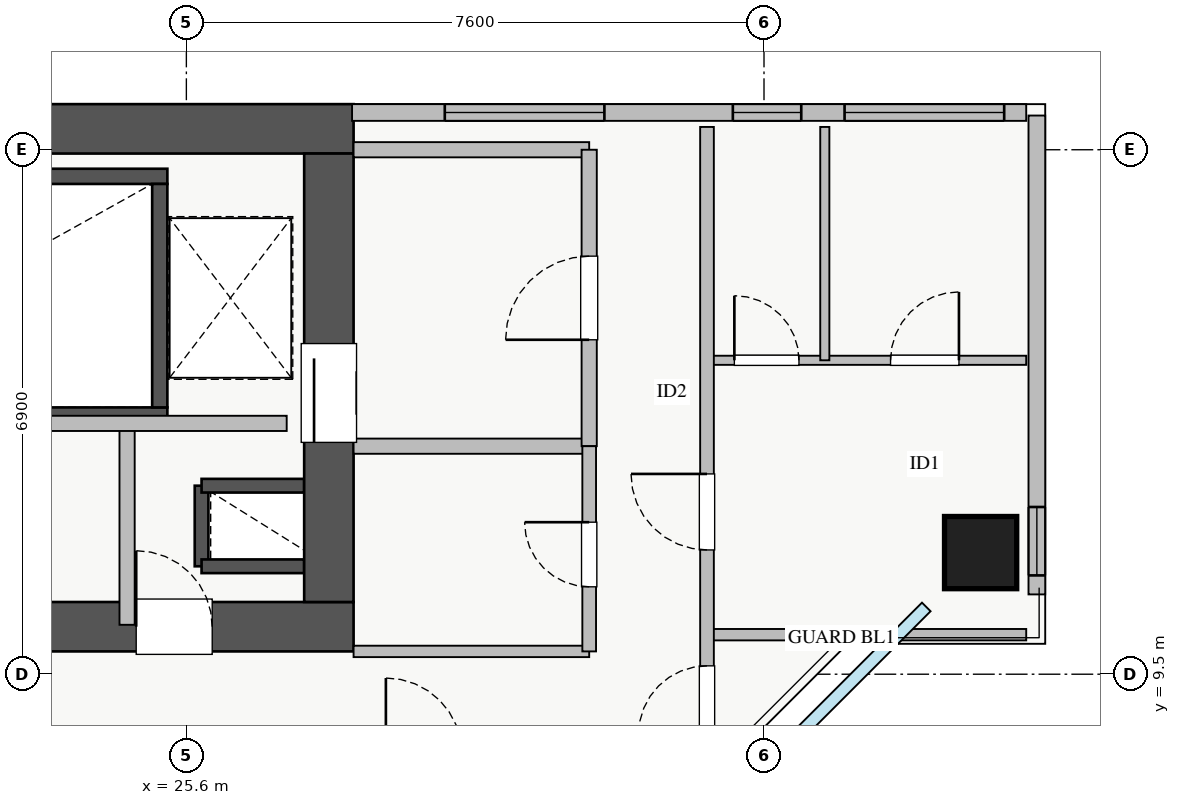
"""IFC4 building model, lengths in metres.
Left out: names, types, materials, properties, quantities, classifications, styles, units other than length and angle.
Written with IfcOpenShell. Run it as: python <this file> out.ifc"""

import sys

from ifc_helpers import new_model, si_unit, direction, frame, frame_2d, origin, origin_2d, place, context, subcontext, project, spatial, rectangle, extrude, source, transform, mapped, element, fill, save


model = new_model("IFC4")
c1 = context("Model", 3, precision=1e-05, world=origin(), true_north=direction((0.0, 1.0)))
c2 = subcontext(c1, "Body", "Model", "MODEL_VIEW")
j1 = project(units=[si_unit("LENGTHUNIT", "METRE"), si_unit("PLANEANGLEUNIT", "RADIAN")], contexts=[c1])
p1 = place(None, origin())
s1 = spatial("IfcSite", under=j1, at=p1, CompositionType="ELEMENT")
p2 = place(p1, origin())
s2 = spatial("IfcBuilding", under=s1, at=p2, CompositionType="ELEMENT")
p3 = place(p2, frame((0.0, 0.0, 156.75)))
s3 = spatial("IfcBuildingStorey", under=s2, at=p3, CompositionType="ELEMENT", Elevation=156.75)
p4 = place(p3, frame((25.8, 10.92, 0.0), z_axis=(0.0, 0.0, 1.0), x_axis=(0.0, 1.0, 0.0)))
e1 = element("IfcWall", 1, at=p4, inside=s3, PredefinedType="SHEAR", context=c2, shape_type="SweptSolid", body=[
    extrude(rectangle(XDim=1.06, YDim=0.18, at=frame_2d((0.53, 0.0))), origin(), (0.0, 0.0, 1.0), 3.07),
])
for number, where, z_axis, x_axis in (
    (2, (25.8, 11.98, 0.0), (0.0, 0.0, 1.0), (1.0, 0.0, 0.0)),
    (3, (25.8, 10.92, 0.0), (0.0, 0.0, 1.0), (1.0, 0.0, 0.0)),
):
    element("IfcWall", number, at=place(p3, frame(where, z_axis=z_axis, x_axis=x_axis)), inside=s3, PredefinedType="SHEAR", context=c2, shape_type="SweptSolid", body=[
        extrude(rectangle(XDim=1.35, YDim=0.18, at=frame_2d((0.675, 0.0))), origin(), (0.0, 0.0, 1.0), 3.07),
    ])
p5 = place(p3, frame((18.2, 12.91, 0.0), z_axis=(0.0, 0.0, 1.0), x_axis=(1.0, 0.0, 0.0)))
e4 = element("IfcWall", 4, at=p5, inside=s3, PredefinedType="SHEAR", context=c2, shape_type="SweptSolid", body=[
    extrude(rectangle(XDim=7.15, YDim=0.2, at=frame_2d((3.575, 0.0))), origin(), (0.0, 0.0, 1.0), 3.25),
])
p6 = place(p5, frame((0.35, 0.0, 0.0)))
e5 = element("IfcOpeningElement", 5, at=p6, cuts=e4, PredefinedType="OPENING", context=c2, shape_type="SweptSolid", body=[
    extrude(rectangle(XDim=1.1, YDim=2.05, at=frame_2d((0.55, 1.025))), frame((0.0, 0.11, 0.0), z_axis=(0.0, -1.0, 0.0), x_axis=(1.0, 0.0, 0.0)), (0.0, 0.0, 1.0), 0.22),
])
p7 = place(p3, frame((18.2, 16.05, 0.0), z_axis=(0.0, 0.0, 1.0), x_axis=(1.0, 0.0, 0.0)))
e6 = element("IfcWall", 6, at=p7, inside=s3, PredefinedType="SHEAR", context=c2, shape_type="SweptSolid", body=[
    extrude(rectangle(XDim=7.15, YDim=0.2, at=frame_2d((3.575, 0.0))), origin(), (0.0, 0.0, 1.0), 3.25),
])
p8 = place(p3, frame((25.25, 13.01, 0.0), z_axis=(0.0, 0.0, 1.0), x_axis=(0.0, 1.0, 0.0)))
e7 = element("IfcWall", 7, at=p8, inside=s3, PredefinedType="SHEAR", context=c2, shape_type="SweptSolid", body=[
    extrude(rectangle(XDim=2.94, YDim=0.2, at=frame_2d((1.47, 0.0))), origin(), (0.0, 0.0, 1.0), 3.25),
])
p9 = place(p3, frame((10.2, 10.125, 0.0), z_axis=(0.0, 0.0, 1.0), x_axis=(1.0, 0.0, 0.0)))
e8 = element("IfcWall", 8, at=p9, inside=s3, PredefinedType="SHEAR", context=c2, shape_type="SweptSolid", body=[
    extrude(rectangle(XDim=17.6, YDim=0.65, at=frame_2d((8.8, 0.0))), origin(), (0.0, 0.0, 1.0), 3.25),
])
p10 = place(p9, frame((1.15, 0.0, 0.0)))
e9 = element("IfcOpeningElement", 9, at=p10, cuts=e8, PredefinedType="OPENING", context=c2, shape_type="SweptSolid", body=[
    extrude(rectangle(XDim=1.1, YDim=2.05, at=frame_2d((0.55, 1.025))), frame((0.0, 0.335, 0.0), z_axis=(0.0, -1.0, 0.0), x_axis=(1.0, 0.0, 0.0)), (0.0, 0.0, 1.0), 0.67),
])
p11 = place(p9, frame((8.3, 0.0, 0.0)))
e10 = element("IfcOpeningElement", 10, at=p11, cuts=e8, PredefinedType="OPENING", context=c2, shape_type="SweptSolid", body=[
    extrude(rectangle(XDim=1.1, YDim=2.05, at=frame_2d((0.55, 1.025))), frame((0.0, 0.335, 0.0), z_axis=(0.0, -1.0, 0.0), x_axis=(1.0, 0.0, 0.0)), (0.0, 0.0, 1.0), 0.67),
])
p12 = place(p9, frame((4.9, 0.0, 0.0)))
e11 = element("IfcOpeningElement", 11, at=p12, cuts=e8, PredefinedType="OPENING", context=c2, shape_type="SweptSolid", body=[
    extrude(rectangle(XDim=1.1, YDim=2.05, at=frame_2d((0.55, 1.025))), frame((0.0, 0.335, 0.0), z_axis=(0.0, -1.0, 0.0), x_axis=(1.0, 0.0, 0.0)), (0.0, 0.0, 1.0), 0.67),
])
p13 = place(p9, frame((14.74, 0.0, 0.0)))
e12 = element("IfcOpeningElement", 12, at=p13, cuts=e8, PredefinedType="OPENING", context=c2, shape_type="SweptSolid", body=[
    extrude(rectangle(XDim=1.0, YDim=2.05, at=frame_2d((0.5, 1.025))), frame((0.0, 0.335, 0.0), z_axis=(0.0, -1.0, 0.0), x_axis=(1.0, 0.0, 0.0)), (0.0, 0.0, 1.0), 0.67),
])
p14 = place(p9, frame((11.67, 0.0, 0.0)))
e13 = element("IfcOpeningElement", 13, at=p14, cuts=e8, PredefinedType="OPENING", context=c2, shape_type="SweptSolid", body=[
    extrude(rectangle(XDim=1.0, YDim=2.05, at=frame_2d((0.5, 1.025))), frame((0.0, 0.335, 0.0), z_axis=(0.0, -1.0, 0.0), x_axis=(1.0, 0.0, 0.0)), (0.0, 0.0, 1.0), 0.67),
])
p15 = place(p3, frame((10.2, 16.675, 0.0), z_axis=(0.0, 0.0, 1.0), x_axis=(1.0, 0.0, 0.0)))
e14 = element("IfcWall", 14, at=p15, inside=s3, PredefinedType="SHEAR", context=c2, shape_type="SweptSolid", body=[
    extrude(rectangle(XDim=17.6, YDim=0.65, at=frame_2d((8.8, 0.0))), origin(), (0.0, 0.0, 1.0), 3.25),
])
p16 = place(p3, frame((27.475, 10.45, 0.0), z_axis=(0.0, 0.0, 1.0), x_axis=(0.0, 1.0, 0.0)))
e15 = element("IfcWall", 15, at=p16, inside=s3, PredefinedType="SHEAR", context=c2, shape_type="SweptSolid", body=[
    extrude(rectangle(XDim=5.9, YDim=0.65, at=frame_2d((2.95, 0.0))), origin(), (0.0, 0.0, 1.0), 3.25),
])
p17 = place(p16, frame((2.1, 0.0, 0.0)))
e16 = element("IfcOpeningElement", 16, at=p17, cuts=e15, PredefinedType="OPENING", context=c2, shape_type="SweptSolid", body=[
    extrude(rectangle(XDim=1.3, YDim=2.05, at=frame_2d((0.65, 1.025))), frame((0.0, 0.335, 0.0), z_axis=(0.0, -1.0, 0.0), x_axis=(1.0, 0.0, 0.0)), (0.0, 0.0, 1.0), 0.67),
])
m1 = source(origin(), c2, "Body", "SweptSolid", [
    extrude(rectangle(XDim=0.95, YDim=0.95, at=origin_2d()), origin(), (0.0, 0.0, 1.0), 3.25),
])
p18 = place(p3, frame((36.05, 11.1, 0.0), z_axis=(0.0, 0.0, 1.0), x_axis=(1.0, 0.0, 0.0)))
e17 = element("IfcColumn", 17, at=p18, inside=s3, PredefinedType="COLUMN", context=c2, shape_type="MappedRepresentation", body=[
    mapped(m1, transform((0.0, 0.0, 0.0), x_axis=(1.0, 0.0, 0.0), y_axis=(0.0, 1.0, 0.0), z_axis=(0.0, 0.0, 1.0), scale=1.0)),
])
p19 = place(p3, frame((27.78, 16.89, 0.0), z_axis=(0.0, 0.0, 1.0), x_axis=(1.0, 0.0, 0.0)))
e18 = element("IfcWall", 18, at=p19, inside=s3, PredefinedType="STANDARD", context=c2, shape_type="SweptSolid", body=[
    extrude(rectangle(XDim=8.87, YDim=0.22, at=frame_2d((4.435, 0.0))), origin(), (0.0, 0.0, 1.0), 2.61),
])
p20 = place(p19, frame((1.22, 0.0, 0.9)))
e19 = element("IfcOpeningElement", 19, at=p20, cuts=e18, PredefinedType="OPENING", context=c2, shape_type="SweptSolid", body=[
    extrude(rectangle(XDim=2.1, YDim=1.48, at=frame_2d((1.05, 0.74))), frame((0.0, 0.12, 0.0), z_axis=(0.0, -1.0, 0.0), x_axis=(1.0, 0.0, 0.0)), (0.0, 0.0, 1.0), 0.24),
])
p21 = place(p19, frame((6.48, 0.0, 0.9)))
e20 = element("IfcOpeningElement", 20, at=p21, cuts=e18, PredefinedType="OPENING", context=c2, shape_type="SweptSolid", body=[
    extrude(rectangle(XDim=2.1, YDim=1.5, at=frame_2d((1.05, 0.75))), frame((0.0, 0.12, 0.0), z_axis=(0.0, -1.0, 0.0), x_axis=(1.0, 0.0, 0.0)), (0.0, 0.0, 1.0), 0.24),
])
p22 = place(p19, frame((5.01, 0.0, 0.9)))
e21 = element("IfcOpeningElement", 21, at=p22, cuts=e18, PredefinedType="OPENING", context=c2, shape_type="SweptSolid", body=[
    extrude(rectangle(XDim=0.9, YDim=1.2, at=frame_2d((0.45, 0.6))), frame((0.0, 0.12, 0.0), z_axis=(0.0, -1.0, 0.0), x_axis=(1.0, 0.0, 0.0)), (0.0, 0.0, 1.0), 0.24),
])
p23 = place(p3, frame((36.79, 10.55, 0.0), z_axis=(0.0, 0.0, 1.0), x_axis=(0.0, 1.0, 0.0)))
e22 = element("IfcWall", 22, at=p23, inside=s3, PredefinedType="STANDARD", context=c2, shape_type="SweptSolid", body=[
    extrude(rectangle(XDim=6.3, YDim=0.22, at=frame_2d((3.15, 0.0))), origin(), (0.0, 0.0, 1.0), 2.61),
])
p24 = place(p23, frame((0.25, 0.0, 0.9)))
e23 = element("IfcOpeningElement", 23, at=p24, cuts=e22, PredefinedType="OPENING", context=c2, shape_type="SweptSolid", body=[
    extrude(rectangle(XDim=0.9, YDim=1.2, at=frame_2d((0.45, 0.6))), frame((0.0, 0.12, 0.0), z_axis=(0.0, -1.0, 0.0), x_axis=(1.0, 0.0, 0.0)), (0.0, 0.0, 1.0), 0.24),
])
for number, where, z_axis, x_axis in (
    (24, (27.8, 16.4, 0.0), (0.0, 0.0, 1.0), (1.0, 0.0, 0.0)),
    (25, (27.8, 12.5, 0.0), (0.0, 0.0, 1.0), (1.0, 0.0, 0.0)),
):
    element("IfcWall", number, at=place(p3, frame(where, z_axis=z_axis, x_axis=x_axis)), inside=s3, PredefinedType="PARTITIONING", context=c2, shape_type="SweptSolid", body=[
        extrude(rectangle(XDim=3.1, YDim=0.2, at=frame_2d((1.55, 0.0))), origin(), (0.0, 0.0, 1.0), 3.07),
    ])
p25 = place(p3, frame((30.9, 12.5, 0.0), z_axis=(0.0, 0.0, 1.0), x_axis=(0.0, 1.0, 0.0)))
e26 = element("IfcWall", 26, at=p25, inside=s3, PredefinedType="PARTITIONING", context=c2, shape_type="SweptSolid", body=[
    extrude(rectangle(XDim=3.9, YDim=0.2, at=frame_2d((1.95, 0.0))), origin(), (0.0, 0.0, 1.0), 3.07),
])
p26 = place(p25, frame((1.4, 0.0, 0.0)))
e27 = element("IfcOpeningElement", 27, at=p26, cuts=e26, PredefinedType="OPENING", context=c2, shape_type="SweptSolid", body=[
    extrude(rectangle(XDim=1.1, YDim=2.05, at=frame_2d((0.55, 1.025))), frame((0.0, 0.11, 0.0), z_axis=(0.0, -1.0, 0.0), x_axis=(1.0, 0.0, 0.0)), (0.0, 0.0, 1.0), 0.22),
])
p27 = place(p3, frame((24.82, 10.15, 0.0), z_axis=(0.0, 0.0, 1.0), x_axis=(0.0, 1.0, 0.0)))
e28 = element("IfcWall", 28, at=p27, inside=s3, PredefinedType="PARTITIONING", context=c2, shape_type="SweptSolid", body=[
    extrude(rectangle(XDim=2.65, YDim=0.2, at=frame_2d((1.325, 0.0))), origin(), (0.0, 0.0, 1.0), 3.07),
])
p28 = place(p3, frame((21.75, 12.8, 0.0), z_axis=(0.0, 0.0, 1.0), x_axis=(1.0, 0.0, 0.0)))
e29 = element("IfcWall", 29, at=p28, inside=s3, PredefinedType="PARTITIONING", context=c2, shape_type="SweptSolid", body=[
    extrude(rectangle(XDim=5.17, YDim=0.2, at=frame_2d((2.585, 0.0))), origin(), (0.0, 0.0, 1.0), 3.07),
])
p29 = place(p3, frame((27.8, 9.8, 0.0), z_axis=(0.0, 0.0, 1.0), x_axis=(1.0, 0.0, 0.0)))
e30 = element("IfcWall", 30, at=p29, inside=s3, PredefinedType="PARTITIONING", context=c2, shape_type="SweptSolid", body=[
    extrude(rectangle(XDim=3.1, YDim=0.15, at=frame_2d((1.55, 0.0))), origin(), (0.0, 0.0, 1.0), 3.07),
])
p30 = place(p3, frame((30.9, 9.8, 0.0), z_axis=(0.0, 0.0, 1.0), x_axis=(0.0, 1.0, 0.0)))
e31 = element("IfcWall", 31, at=p30, inside=s3, PredefinedType="PARTITIONING", context=c2, shape_type="SweptSolid", body=[
    extrude(rectangle(XDim=2.7, YDim=0.18, at=frame_2d((1.35, 0.0))), origin(), (0.0, 0.0, 1.0), 2.577),
])
p31 = place(p30, frame((0.85, 0.0, 0.0)))
e32 = element("IfcOpeningElement", 32, at=p31, cuts=e31, PredefinedType="OPENING", context=c2, shape_type="SweptSolid", body=[
    extrude(rectangle(XDim=0.85, YDim=2.05, at=frame_2d((0.425, 1.025))), frame((0.0, 0.1, 0.0), z_axis=(0.0, -1.0, 0.0), x_axis=(1.0, 0.0, 0.0)), (0.0, 0.0, 1.0), 0.2),
])
p32 = place(p3, frame((32.45, 13.63, 0.0), z_axis=(0.0, 0.0, 1.0), x_axis=(1.0, 0.0, 0.0)))
e33 = element("IfcWall", 33, at=p32, inside=s3, PredefinedType="PLUMBINGWALL", context=c2, shape_type="SweptSolid", body=[
    extrude(rectangle(XDim=4.2, YDim=0.12, at=frame_2d((2.1, 0.0))), origin(), (0.0, 0.0, 1.0), 3.07),
])
p33 = place(p32, frame((0.36, 0.0, 0.0)))
e34 = element("IfcOpeningElement", 34, at=p33, cuts=e33, PredefinedType="OPENING", context=c2, shape_type="SweptSolid", body=[
    extrude(rectangle(XDim=0.85, YDim=2.05, at=frame_2d((0.425, 1.025))), frame((0.0, 0.07, 0.0), z_axis=(0.0, -1.0, 0.0), x_axis=(1.0, 0.0, 0.0)), (0.0, 0.0, 1.0), 0.14),
])
p34 = place(p32, frame((2.415, 0.0, 0.0)))
e35 = element("IfcOpeningElement", 35, at=p34, cuts=e33, PredefinedType="OPENING", context=c2, shape_type="SweptSolid", body=[
    extrude(rectangle(XDim=0.9, YDim=2.05, at=frame_2d((0.45, 1.025))), frame((0.0, 0.07, 0.0), z_axis=(0.0, -1.0, 0.0), x_axis=(1.0, 0.0, 0.0)), (0.0, 0.0, 1.0), 0.14),
])
p35 = place(p3, frame((34.0, 13.63, 0.0), z_axis=(0.0, 0.0, 1.0), x_axis=(0.0, 1.0, 0.0)))
e36 = element("IfcWall", 36, at=p35, inside=s3, PredefinedType="PLUMBINGWALL", context=c2, shape_type="SweptSolid", body=[
    extrude(rectangle(XDim=3.07, YDim=0.12, at=frame_2d((1.535, 0.0))), origin(), (0.0, 0.0, 1.0), 3.07),
])
p36 = place(p3, frame((32.45, 10.02, 0.0), z_axis=(0.0, 0.0, 1.0), x_axis=(1.0, 0.0, 0.0)))
e37 = element("IfcWall", 37, at=p36, inside=s3, PredefinedType="PARTITIONING", context=c2, shape_type="SweptSolid", body=[
    extrude(rectangle(XDim=4.2, YDim=0.15, at=frame_2d((2.1, 0.0))), origin(), (0.0, 0.0, 1.0), 3.07),
])
p37 = place(p3, frame((32.45, 5.35, 0.0), z_axis=(0.0, 0.0, 1.0), x_axis=(0.0, 1.0, 0.0)))
e38 = element("IfcWall", 38, at=p37, inside=s3, PredefinedType="PARTITIONING", context=c2, shape_type="SweptSolid", body=[
    extrude(rectangle(XDim=11.35, YDim=0.18, at=frame_2d((5.675, 0.0))), origin(), (0.0, 0.0, 1.0), 3.07),
])
p38 = place(p37, frame((3.36, 0.0, 0.0)))
e39 = element("IfcOpeningElement", 39, at=p38, cuts=e38, PredefinedType="OPENING", context=c2, shape_type="SweptSolid", body=[
    extrude(rectangle(XDim=0.9, YDim=2.05, at=frame_2d((0.45, 1.025))), frame((0.0, 0.1, 0.0), z_axis=(0.0, -1.0, 0.0), x_axis=(1.0, 0.0, 0.0)), (0.0, 0.0, 1.0), 0.2),
])
p39 = place(p37, frame((5.785, 0.0, 0.0)))
e40 = element("IfcOpeningElement", 40, at=p39, cuts=e38, PredefinedType="OPENING", context=c2, shape_type="SweptSolid", body=[
    extrude(rectangle(XDim=1.0, YDim=2.05, at=frame_2d((0.5, 1.025))), frame((0.0, 0.1, 0.0), z_axis=(0.0, -1.0, 0.0), x_axis=(1.0, 0.0, 0.0)), (0.0, 0.0, 1.0), 0.2),
])
m2 = source(origin(), c2, "Body", "SweptSolid", [
    extrude(rectangle(XDim=2.1, YDim=1.48, at=frame_2d((1.05, 0.74))), frame((0.0, 0.03, 0.0), z_axis=(0.0, -1.0, 0.0), x_axis=(1.0, 0.0, 0.0)), (0.0, 0.0, 1.0), 0.06),
])
p40 = place(p20, origin())
e41 = element("IfcWindow", 41, at=p40, inside=s3, PartitioningType="TRIPLE_PANEL_VERTICAL", PredefinedType="WINDOW", context=c2, shape_type="MappedRepresentation", body=[
    mapped(m2, transform((0.0, 0.0, 0.0), x_axis=(1.0, 0.0, 0.0), y_axis=(0.0, 1.0, 0.0), z_axis=(0.0, 0.0, 1.0), scale=1.0)),
])
fill(e19, e41)
m3 = source(origin(), c2, "Body", "SweptSolid", [
    extrude(rectangle(XDim=2.1, YDim=1.5, at=frame_2d((1.05, 0.75))), frame((0.0, 0.03, 0.0), z_axis=(0.0, -1.0, 0.0), x_axis=(1.0, 0.0, 0.0)), (0.0, 0.0, 1.0), 0.06),
])
p41 = place(p21, origin())
e42 = element("IfcWindow", 42, at=p41, inside=s3, PartitioningType="TRIPLE_PANEL_VERTICAL", PredefinedType="WINDOW", context=c2, shape_type="MappedRepresentation", body=[
    mapped(m3, transform((0.0, 0.0, 0.0), x_axis=(1.0, 0.0, 0.0), y_axis=(0.0, 1.0, 0.0), z_axis=(0.0, 0.0, 1.0), scale=1.0)),
])
fill(e20, e42)
m4 = source(origin(), c2, "Body", "SweptSolid", [
    extrude(rectangle(XDim=1.3, YDim=2.05, at=frame_2d((0.65, 1.025))), frame((0.0, 0.025, 0.0), z_axis=(0.0, -1.0, 0.0), x_axis=(1.0, 0.0, 0.0)), (0.0, 0.0, 1.0), 0.05),
])
p42 = place(p17, origin())
e43 = element("IfcDoor", 43, at=p42, inside=s3, OperationType="SLIDING_TO_RIGHT", PredefinedType="DOOR", context=c2, shape_type="MappedRepresentation", body=[
    mapped(m4, transform((0.0, 0.0, 0.0), x_axis=(1.0, 0.0, 0.0), y_axis=(0.0, 1.0, 0.0), z_axis=(0.0, 0.0, 1.0), scale=1.0)),
])
fill(e16, e43)
m5 = source(origin(), c2, "Body", "SweptSolid", [
    extrude(rectangle(XDim=1.0, YDim=2.05, at=frame_2d((0.5, 1.025))), frame((0.0, 0.025, 0.0), z_axis=(0.0, -1.0, 0.0), x_axis=(1.0, 0.0, 0.0)), (0.0, 0.0, 1.0), 0.05),
])
p43 = place(p13, origin())
e44 = element("IfcDoor", 44, at=p43, inside=s3, OperationType="SINGLE_SWING_LEFT", PredefinedType="DOOR", context=c2, shape_type="MappedRepresentation", body=[
    mapped(m5, transform((0.0, 0.0, 0.0), x_axis=(1.0, 0.0, 0.0), y_axis=(0.0, 1.0, 0.0), z_axis=(0.0, 0.0, 1.0), scale=1.0)),
])
fill(e12, e44)
m6 = source(origin(), c2, "Body", "SweptSolid", [
    extrude(rectangle(XDim=1.1, YDim=2.05, at=frame_2d((0.55, 1.025))), frame((0.0, 0.025, 0.0), z_axis=(0.0, -1.0, 0.0), x_axis=(1.0, 0.0, 0.0)), (0.0, 0.0, 1.0), 0.05),
])
p44 = place(p26, origin())
e45 = element("IfcDoor", 45, at=p44, inside=s3, OperationType="SINGLE_SWING_LEFT", PredefinedType="DOOR", context=c2, shape_type="MappedRepresentation", body=[
    mapped(m6, transform((0.0, 0.0, 0.0), x_axis=(1.0, 0.0, 0.0), y_axis=(0.0, 1.0, 0.0), z_axis=(0.0, 0.0, 1.0), scale=1.0)),
])
fill(e27, e45)
m7 = source(origin(), c2, "Body", "SweptSolid", [
    extrude(rectangle(XDim=0.85, YDim=2.05, at=frame_2d((0.425, 1.025))), frame((0.0, 0.025, 0.0), z_axis=(0.0, -1.0, 0.0), x_axis=(1.0, 0.0, 0.0)), (0.0, 0.0, 1.0), 0.05),
])
p45 = place(p31, origin())
e46 = element("IfcDoor", 46, at=p45, inside=s3, OperationType="SINGLE_SWING_RIGHT", PredefinedType="DOOR", context=c2, shape_type="MappedRepresentation", body=[
    mapped(m7, transform((0.0, 0.0, 0.0), x_axis=(1.0, 0.0, 0.0), y_axis=(0.0, 1.0, 0.0), z_axis=(0.0, 0.0, 1.0), scale=1.0)),
])
fill(e32, e46)
p46 = place(p33, origin())
e47 = element("IfcDoor", 47, at=p46, inside=s3, OperationType="SINGLE_SWING_LEFT", PredefinedType="DOOR", context=c2, shape_type="MappedRepresentation", body=[
    mapped(m7, transform((0.0, 0.0, 0.0), x_axis=(1.0, 0.0, 0.0), y_axis=(0.0, 1.0, 0.0), z_axis=(0.0, 0.0, 1.0), scale=1.0)),
])
fill(e34, e47)
m8 = source(origin(), c2, "Body", "SweptSolid", [
    extrude(rectangle(XDim=0.9, YDim=2.05, at=frame_2d((0.45, 1.025))), frame((0.0, 0.025, 0.0), z_axis=(0.0, -1.0, 0.0), x_axis=(1.0, 0.0, 0.0)), (0.0, 0.0, 1.0), 0.05),
])
p47 = place(p34, origin())
e48 = element("IfcDoor", 48, at=p47, inside=s3, OperationType="SINGLE_SWING_RIGHT", PredefinedType="DOOR", context=c2, shape_type="MappedRepresentation", body=[
    mapped(m8, transform((0.0, 0.0, 0.0), x_axis=(1.0, 0.0, 0.0), y_axis=(0.0, 1.0, 0.0), z_axis=(0.0, 0.0, 1.0), scale=1.0)),
])
fill(e35, e48)
p48 = place(p38, origin())
e49 = element("IfcDoor", 49, at=p48, inside=s3, OperationType="SINGLE_SWING_LEFT", PredefinedType="DOOR", context=c2, shape_type="MappedRepresentation", body=[
    mapped(m8, transform((0.0, 0.0, 0.0), x_axis=(1.0, 0.0, 0.0), y_axis=(0.0, 1.0, 0.0), z_axis=(0.0, 0.0, 1.0), scale=1.0)),
])
fill(e39, e49)
p49 = place(p39, origin())
e50 = element("IfcDoor", 50, at=p49, inside=s3, OperationType="SINGLE_SWING_RIGHT", PredefinedType="DOOR", context=c2, shape_type="MappedRepresentation", body=[
    mapped(m5, transform((0.0, 0.0, 0.0), x_axis=(1.0, 0.0, 0.0), y_axis=(0.0, 1.0, 0.0), z_axis=(0.0, 0.0, 1.0), scale=1.0)),
])
fill(e40, e50)
m9 = source(origin(), c2, "Body", "SweptSolid", [
    extrude(rectangle(XDim=0.9, YDim=1.2, at=frame_2d((0.45, 0.6))), frame((0.0, 0.03, 0.0), z_axis=(0.0, -1.0, 0.0), x_axis=(1.0, 0.0, 0.0)), (0.0, 0.0, 1.0), 0.06),
])
p50 = place(p22, origin())
e51 = element("IfcWindow", 51, at=p50, inside=s3, PartitioningType="SINGLE_PANEL", PredefinedType="WINDOW", context=c2, shape_type="MappedRepresentation", body=[
    mapped(m9, transform((0.0, 0.0, 0.0), x_axis=(1.0, 0.0, 0.0), y_axis=(0.0, 1.0, 0.0), z_axis=(0.0, 0.0, 1.0), scale=1.0)),
])
fill(e21, e51)
p51 = place(p24, origin())
e52 = element("IfcWindow", 52, at=p51, inside=s3, PartitioningType="SINGLE_PANEL", PredefinedType="WINDOW", context=c2, shape_type="MappedRepresentation", body=[
    mapped(m9, transform((0.0, 0.0, 0.0), x_axis=(1.0, 0.0, 0.0), y_axis=(0.0, 1.0, 0.0), z_axis=(0.0, 0.0, 1.0), scale=1.0)),
])
fill(e23, e52)
save(model, sys.argv[1])
